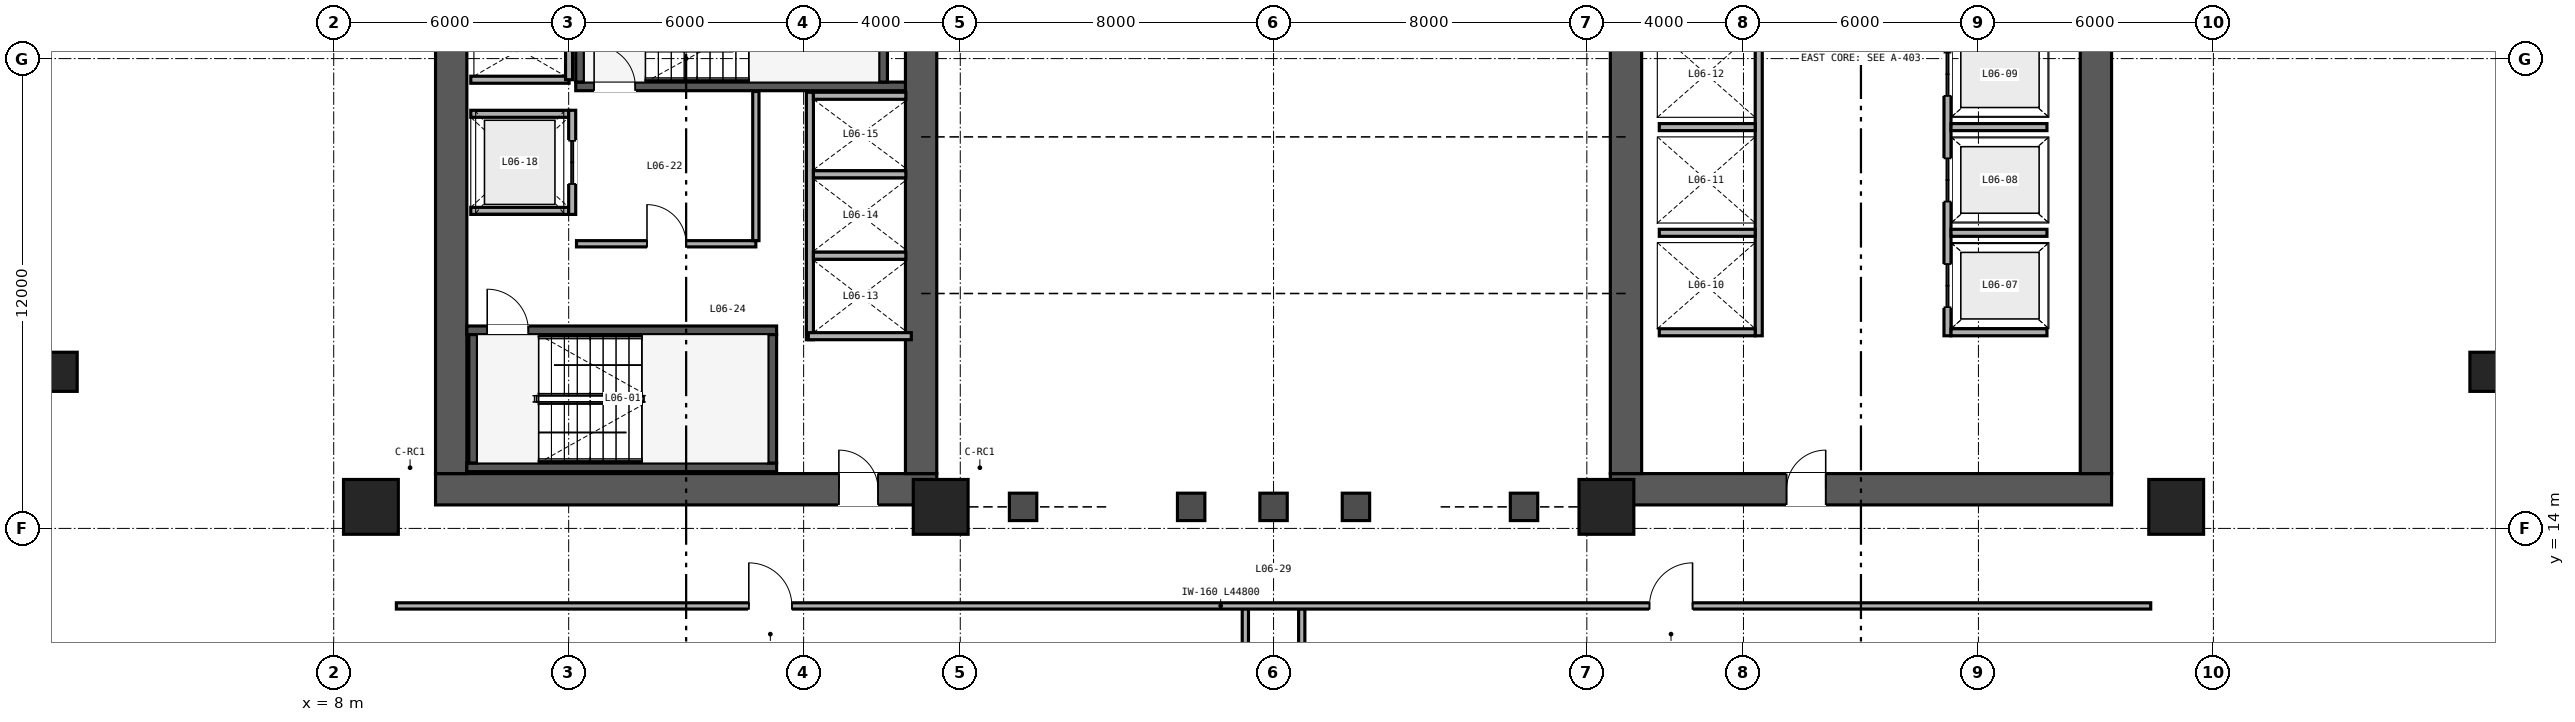
"""IFC4 building model, lengths in metres.
Left out: names, types, materials, properties, quantities, classifications, styles, units other than length and angle.
Written with IfcOpenShell. Run it as: python <this file> out.ifc"""

import sys

from ifc_helpers import new_model, si_unit, direction, frame, frame_2d, origin, origin_2d, place, context, subcontext, project, spatial, rectangle, extrude, source, transform, mapped, element, fill, save


model = new_model("IFC4")
c1 = context("Model", 3, precision=1e-05, world=origin(), true_north=direction((0.0, 1.0)))
c2 = subcontext(c1, "Body", "Model", "MODEL_VIEW")
j1 = project(units=[si_unit("LENGTHUNIT", "METRE"), si_unit("PLANEANGLEUNIT", "RADIAN")], contexts=[c1])
p1 = place(None, origin())
s1 = spatial("IfcSite", under=j1, at=p1, CompositionType="ELEMENT")
p2 = place(p1, origin())
s2 = spatial("IfcBuilding", under=s1, at=p2, CompositionType="ELEMENT")
p3 = place(p2, frame((0.0, 0.0, 28.8)))
s3 = spatial("IfcBuildingStorey", under=s2, at=p3, CompositionType="ELEMENT", Elevation=28.8)
p4 = place(p3, frame((10.6, 15.0, 0.0), z_axis=(0.0, 0.0, 1.0), x_axis=(1.0, 0.0, 0.0)))
e1 = element("IfcWall", 1, at=p4, inside=s3, PredefinedType="SHEAR", context=c2, shape_type="SweptSolid", body=[
    extrude(rectangle(XDim=12.8, YDim=0.8, at=frame_2d((6.4, 0.0))), origin(), (0.0, 0.0, 1.0), 5.75),
])
p5 = place(p4, frame((10.3, 0.0, 0.0)))
e2 = element("IfcOpeningElement", 2, at=p5, cuts=e1, PredefinedType="OPENING", context=c2, shape_type="SweptSolid", body=[
    extrude(rectangle(XDim=1.0, YDim=2.15, at=frame_2d((0.5, 1.075))), frame((0.0, 0.41, 0.0), z_axis=(0.0, -1.0, 0.0), x_axis=(1.0, 0.0, 0.0)), (0.0, 0.0, 1.0), 0.82),
])
for number, where, z_axis, x_axis in (
    (3, (11.0, 15.4, 0.0), (0.0, 0.0, 1.0), (0.0, 1.0, 0.0)),
    (4, (23.0, 15.4, 0.0), (0.0, 0.0, 1.0), (0.0, 1.0, 0.0)),
):
    element("IfcWall", number, at=place(p3, frame(where, z_axis=z_axis, x_axis=x_axis)), inside=s3, PredefinedType="SHEAR", context=c2, shape_type="SweptSolid", body=[
        extrude(rectangle(XDim=21.2, YDim=0.8, at=frame_2d((10.6, 0.0))), origin(), (0.0, 0.0, 1.0), 5.75),
    ])
p6 = place(p3, frame((40.6, 15.0, 0.0), z_axis=(0.0, 0.0, 1.0), x_axis=(1.0, 0.0, 0.0)))
e5 = element("IfcWall", 5, at=p6, inside=s3, PredefinedType="SHEAR", context=c2, shape_type="SweptSolid", body=[
    extrude(rectangle(XDim=12.8, YDim=0.8, at=frame_2d((6.4, 0.0))), origin(), (0.0, 0.0, 1.0), 5.75),
])
p7 = place(p6, frame((4.5, 0.0, 0.0)))
e6 = element("IfcOpeningElement", 6, at=p7, cuts=e5, PredefinedType="OPENING", context=c2, shape_type="SweptSolid", body=[
    extrude(rectangle(XDim=1.0, YDim=2.15, at=frame_2d((0.5, 1.075))), frame((0.0, 0.41, 0.0), z_axis=(0.0, -1.0, 0.0), x_axis=(1.0, 0.0, 0.0)), (0.0, 0.0, 1.0), 0.82),
])
for number, where, z_axis, x_axis in (
    (7, (41.0, 15.4, 0.0), (0.0, 0.0, 1.0), (0.0, 1.0, 0.0)),
    (8, (53.0, 15.4, 0.0), (0.0, 0.0, 1.0), (0.0, 1.0, 0.0)),
):
    element("IfcWall", number, at=place(p3, frame(where, z_axis=z_axis, x_axis=x_axis)), inside=s3, PredefinedType="SHEAR", context=c2, shape_type="SweptSolid", body=[
        extrude(rectangle(XDim=21.2, YDim=0.8, at=frame_2d((10.6, 0.0))), origin(), (0.0, 0.0, 1.0), 5.75),
    ])
p8 = place(p3, frame((11.4, 15.56, 0.0), z_axis=(0.0, 0.0, 1.0), x_axis=(1.0, 0.0, 0.0)))
e9 = element("IfcWall", 9, at=p8, inside=s3, PredefinedType="SHEAR", context=c2, shape_type="SweptSolid", body=[
    extrude(rectangle(XDim=7.91, YDim=0.22, at=frame_2d((3.955, 0.0))), origin(), (0.0, 0.0, 1.0), 5.8),
])
p9 = place(p3, frame((11.4, 19.06, 0.0), z_axis=(0.0, 0.0, 1.0), x_axis=(1.0, 0.0, 0.0)))
e10 = element("IfcWall", 10, at=p9, inside=s3, PredefinedType="SHEAR", context=c2, shape_type="SweptSolid", body=[
    extrude(rectangle(XDim=7.91, YDim=0.22, at=frame_2d((3.955, 0.0))), origin(), (0.0, 0.0, 1.0), 5.8),
])
p10 = place(p9, frame((0.52, 0.0, 0.0)))
e11 = element("IfcOpeningElement", 11, at=p10, cuts=e10, PredefinedType="OPENING", context=c2, shape_type="SweptSolid", body=[
    extrude(rectangle(XDim=1.05, YDim=2.15, at=frame_2d((0.525, 1.075))), frame((0.0, 0.12, 0.0), z_axis=(0.0, -1.0, 0.0), x_axis=(1.0, 0.0, 0.0)), (0.0, 0.0, 1.0), 0.24),
])
for number, where, z_axis, x_axis in (
    (12, (11.56, 15.67, 0.0), (0.0, 0.0, 1.0), (0.0, 1.0, 0.0)),
    (13, (19.2, 15.67, 0.0), (0.0, 0.0, 1.0), (0.0, 1.0, 0.0)),
):
    element("IfcWall", number, at=place(p3, frame(where, z_axis=z_axis, x_axis=x_axis)), inside=s3, PredefinedType="SHEAR", context=c2, shape_type="SweptSolid", body=[
        extrude(rectangle(XDim=3.28, YDim=0.22, at=frame_2d((1.64, 0.0))), origin(), (0.0, 0.0, 1.0), 5.8),
    ])
p11 = place(p3, frame((14.18, 25.29, 0.0), z_axis=(0.0, 0.0, 1.0), x_axis=(1.0, 0.0, 0.0)))
e14 = element("IfcWall", 14, at=p11, inside=s3, PredefinedType="SHEAR", context=c2, shape_type="SweptSolid", body=[
    extrude(rectangle(XDim=8.42, YDim=0.22, at=frame_2d((4.21, 0.0))), origin(), (0.0, 0.0, 1.0), 5.8),
])
p12 = place(p11, frame((0.47, 0.0, 0.0)))
e15 = element("IfcOpeningElement", 15, at=p12, cuts=e14, PredefinedType="OPENING", context=c2, shape_type="SweptSolid", body=[
    extrude(rectangle(XDim=1.05, YDim=2.15, at=frame_2d((0.525, 1.075))), frame((0.0, 0.12, 0.0), z_axis=(0.0, -1.0, 0.0), x_axis=(1.0, 0.0, 0.0)), (0.0, 0.0, 1.0), 0.24),
])
for number, where, z_axis, x_axis in (
    (16, (14.29, 25.4, 0.0), (0.0, 0.0, 1.0), (0.0, 1.0, 0.0)),
    (17, (22.03, 25.4, 0.0), (0.0, 0.0, 1.0), (0.0, 1.0, 0.0)),
):
    element("IfcWall", number, at=place(p3, frame(where, z_axis=z_axis, x_axis=x_axis)), inside=s3, PredefinedType="SHEAR", context=c2, shape_type="SweptSolid", body=[
        extrude(rectangle(XDim=3.28, YDim=0.22, at=frame_2d((1.64, 0.0))), origin(), (0.0, 0.0, 1.0), 5.8),
    ])
m1 = source(origin(), c2, "Body", "SweptSolid", [
    extrude(rectangle(XDim=1.0, YDim=1.0, at=origin_2d()), origin(), (0.0, 0.0, 1.0), 5.75),
])
for number, where, z_axis, x_axis in (
    (18, (0.95, 18.0, 0.0), (0.0, 0.0, 1.0), (1.0, 0.0, 0.0)),
    (19, (63.05, 18.0, 0.0), (0.0, 0.0, 1.0), (1.0, 0.0, 0.0)),
):
    element("IfcColumn", number, at=place(p3, frame(where, z_axis=z_axis, x_axis=x_axis)), inside=s3, PredefinedType="COLUMN", context=c2, shape_type="MappedRepresentation", body=[
        mapped(m1, transform((0.0, 0.0, 0.0), scale=1.0)),
    ])
m2 = source(origin(), c2, "Body", "SweptSolid", [
    extrude(rectangle(XDim=1.4, YDim=1.4, at=origin_2d()), origin(), (0.0, 0.0, 1.0), 5.75),
])
for number, where, z_axis, x_axis in (
    (20, (8.95, 14.55, 0.0), (0.0, 0.0, 1.0), (1.0, 0.0, 0.0)),
    (21, (23.5, 14.55, 0.0), (0.0, 0.0, 1.0), (1.0, 0.0, 0.0)),
    (22, (40.5, 14.55, 0.0), (0.0, 0.0, 1.0), (1.0, 0.0, 0.0)),
    (23, (55.05, 14.55, 0.0), (0.0, 0.0, 1.0), (1.0, 0.0, 0.0)),
):
    element("IfcColumn", number, at=place(p3, frame(where, z_axis=z_axis, x_axis=x_axis)), inside=s3, PredefinedType="COLUMN", context=c2, shape_type="MappedRepresentation", body=[
        mapped(m2, transform((0.0, 0.0, 0.0), scale=1.0)),
    ])
p13 = place(p3, frame((49.21, 18.92, 0.0), z_axis=(0.0, 0.0, 1.0), x_axis=(0.0, 1.0, 0.0)))
e24 = element("IfcWall", 24, at=p13, inside=s3, PredefinedType="SOLIDWALL", context=c2, shape_type="SweptSolid", body=[
    extrude(rectangle(XDim=7.96, YDim=0.18, at=frame_2d((3.98, 0.0))), origin(), (0.0, 0.0, 1.0), 5.75),
])
p14 = place(p13, frame((0.73, 0.0, 0.0)))
e25 = element("IfcOpeningElement", 25, at=p14, cuts=e24, PredefinedType="OPENING", context=c2, shape_type="SweptSolid", body=[
    extrude(rectangle(XDim=1.1, YDim=2.2, at=frame_2d((0.55, 1.1))), frame((0.0, 0.1, 0.0), z_axis=(0.0, -1.0, 0.0), x_axis=(1.0, 0.0, 0.0)), (0.0, 0.0, 1.0), 0.2),
])
p15 = place(p13, frame((3.43, 0.0, 0.0)))
e26 = element("IfcOpeningElement", 26, at=p15, cuts=e24, PredefinedType="OPENING", context=c2, shape_type="SweptSolid", body=[
    extrude(rectangle(XDim=1.1, YDim=2.2, at=frame_2d((0.55, 1.1))), frame((0.0, 0.1, 0.0), z_axis=(0.0, -1.0, 0.0), x_axis=(1.0, 0.0, 0.0)), (0.0, 0.0, 1.0), 0.2),
])
p16 = place(p13, frame((6.13, 0.0, 0.0)))
e27 = element("IfcOpeningElement", 27, at=p16, cuts=e24, PredefinedType="OPENING", context=c2, shape_type="SweptSolid", body=[
    extrude(rectangle(XDim=1.1, YDim=2.2, at=frame_2d((0.55, 1.1))), frame((0.0, 0.1, 0.0), z_axis=(0.0, -1.0, 0.0), x_axis=(1.0, 0.0, 0.0)), (0.0, 0.0, 1.0), 0.2),
])
for number, where, z_axis, x_axis in (
    (28, (49.3, 19.01, 0.0), (0.0, 0.0, 1.0), (1.0, 0.0, 0.0)),
    (29, (49.3, 21.55, 0.0), (0.0, 0.0, 1.0), (1.0, 0.0, 0.0)),
    (30, (49.3, 24.25, 0.0), (0.0, 0.0, 1.0), (1.0, 0.0, 0.0)),
):
    element("IfcWall", number, at=place(p3, frame(where, z_axis=z_axis, x_axis=x_axis)), inside=s3, PredefinedType="SOLIDWALL", context=c2, shape_type="SweptSolid", body=[
        extrude(rectangle(XDim=2.45, YDim=0.18, at=frame_2d((1.225, 0.0))), origin(), (0.0, 0.0, 1.0), 5.75),
    ])
p17 = place(p3, frame((44.39, 18.92, 0.0), z_axis=(0.0, 0.0, 1.0), x_axis=(0.0, 1.0, 0.0)))
e31 = element("IfcWall", 31, at=p17, inside=s3, PredefinedType="SOLIDWALL", context=c2, shape_type="SweptSolid", body=[
    extrude(rectangle(XDim=7.96, YDim=0.18, at=frame_2d((3.98, 0.0))), origin(), (0.0, 0.0, 1.0), 5.75),
])
for number, where, z_axis, x_axis in (
    (32, (41.85, 19.01, 0.0), (0.0, 0.0, 1.0), (1.0, 0.0, 0.0)),
    (33, (41.85, 21.55, 0.0), (0.0, 0.0, 1.0), (1.0, 0.0, 0.0)),
    (34, (41.85, 24.25, 0.0), (0.0, 0.0, 1.0), (1.0, 0.0, 0.0)),
):
    element("IfcWall", number, at=place(p3, frame(where, z_axis=z_axis, x_axis=x_axis)), inside=s3, PredefinedType="SOLIDWALL", context=c2, shape_type="SweptSolid", body=[
        extrude(rectangle(XDim=2.45, YDim=0.18, at=frame_2d((1.225, 0.0))), origin(), (0.0, 0.0, 1.0), 5.75),
    ])
p18 = place(p3, frame((20.16, 18.82, 0.0), z_axis=(0.0, 0.0, 1.0), x_axis=(0.0, 1.0, 0.0)))
e35 = element("IfcWall", 35, at=p18, inside=s3, PredefinedType="SOLIDWALL", context=c2, shape_type="SweptSolid", body=[
    extrude(rectangle(XDim=6.32, YDim=0.18, at=frame_2d((3.16, 0.0))), origin(), (0.0, 0.0, 1.0), 4.65),
])
p19 = place(p3, frame((20.12, 18.91, 0.0), z_axis=(0.0, 0.0, 1.0), x_axis=(1.0, 0.0, 0.0)))
e36 = element("IfcWall", 36, at=p19, inside=s3, PredefinedType="SOLIDWALL", context=c2, shape_type="SweptSolid", body=[
    extrude(rectangle(XDim=2.63, YDim=0.18, at=frame_2d((1.315, 0.0))), origin(), (0.0, 0.0, 1.0), 5.75),
])
p20 = place(p3, frame((20.25, 25.05, 0.0), z_axis=(0.0, 0.0, 1.0), x_axis=(1.0, 0.0, 0.0)))
e37 = element("IfcWall", 37, at=p20, inside=s3, PredefinedType="SOLIDWALL", context=c2, shape_type="SweptSolid", body=[
    extrude(rectangle(XDim=2.36, YDim=0.18, at=frame_2d((1.18, 0.0))), origin(), (0.0, 0.0, 1.0), 5.75),
])
p21 = place(p3, frame((20.25, 20.965, 0.0), z_axis=(0.0, 0.0, 1.0), x_axis=(1.0, 0.0, 0.0)))
e38 = element("IfcWall", 38, at=p21, inside=s3, PredefinedType="SOLIDWALL", context=c2, shape_type="SweptSolid", body=[
    extrude(rectangle(XDim=2.36, YDim=0.18, at=frame_2d((1.18, 0.0))), origin(), (0.0, 0.0, 1.0), 4.65),
])
p22 = place(p3, frame((20.25, 23.045, 0.0), z_axis=(0.0, 0.0, 1.0), x_axis=(1.0, 0.0, 0.0)))
e39 = element("IfcWall", 39, at=p22, inside=s3, PredefinedType="SOLIDWALL", context=c2, shape_type="SweptSolid", body=[
    extrude(rectangle(XDim=2.36, YDim=0.18, at=frame_2d((1.18, 0.0))), origin(), (0.0, 0.0, 1.0), 5.75),
])
for number, where, z_axis, x_axis in (
    (40, (11.5, 22.11, 0.0), (0.0, 0.0, 1.0), (1.0, 0.0, 0.0)),
    (41, (11.5, 24.59, 0.0), (0.0, 0.0, 1.0), (1.0, 0.0, 0.0)),
):
    element("IfcWall", number, at=place(p3, frame(where, z_axis=z_axis, x_axis=x_axis)), inside=s3, PredefinedType="SOLIDWALL", context=c2, shape_type="SweptSolid", body=[
        extrude(rectangle(XDim=2.5, YDim=0.18, at=frame_2d((1.25, 0.0))), origin(), (0.0, 0.0, 1.0), 5.75),
    ])
p23 = place(p3, frame((14.09, 22.02, 0.0), z_axis=(0.0, 0.0, 1.0), x_axis=(0.0, 1.0, 0.0)))
e42 = element("IfcWall", 42, at=p23, inside=s3, PredefinedType="SOLIDWALL", context=c2, shape_type="SweptSolid", body=[
    extrude(rectangle(XDim=2.66, YDim=0.18, at=frame_2d((1.33, 0.0))), origin(), (0.0, 0.0, 1.0), 5.75),
])
p24 = place(p23, frame((0.78, 0.0, 0.0)))
e43 = element("IfcOpeningElement", 43, at=p24, cuts=e42, PredefinedType="OPENING", context=c2, shape_type="SweptSolid", body=[
    extrude(rectangle(XDim=1.1, YDim=2.2, at=frame_2d((0.55, 1.1))), frame((0.0, 0.1, 0.0), z_axis=(0.0, -1.0, 0.0), x_axis=(1.0, 0.0, 0.0)), (0.0, 0.0, 1.0), 0.2),
])
p25 = place(p3, frame((11.5, 25.46, 0.0), z_axis=(0.0, 0.0, 1.0), x_axis=(1.0, 0.0, 0.0)))
e44 = element("IfcWall", 44, at=p25, inside=s3, PredefinedType="SOLIDWALL", context=c2, shape_type="SweptSolid", body=[
    extrude(rectangle(XDim=2.51, YDim=0.18, at=frame_2d((1.255, 0.0))), origin(), (0.0, 0.0, 1.0), 5.75),
])
p26 = place(p3, frame((14.01, 25.46, 0.0), z_axis=(0.0, 0.0, 1.0), x_axis=(0.0, 1.0, 0.0)))
e45 = element("IfcWall", 45, at=p26, inside=s3, PredefinedType="SOLIDWALL", context=c2, shape_type="SweptSolid", body=[
    extrude(rectangle(XDim=3.08, YDim=0.18, at=frame_2d((1.54, 0.0))), origin(), (0.0, 0.0, 1.0), 5.75),
])
p27 = place(p3, frame((14.2, 21.27, 0.0), z_axis=(0.0, 0.0, 1.0), x_axis=(1.0, 0.0, 0.0)))
e46 = element("IfcWall", 46, at=p27, inside=s3, PredefinedType="PARTITIONING", context=c2, shape_type="SweptSolid", body=[
    extrude(rectangle(XDim=4.58, YDim=0.16, at=frame_2d((2.29, 0.0))), origin(), (0.0, 0.0, 1.0), 5.75),
])
p28 = place(p27, frame((1.8, 0.0, 0.0)))
e47 = element("IfcOpeningElement", 47, at=p28, cuts=e46, PredefinedType="OPENING", context=c2, shape_type="SweptSolid", body=[
    extrude(rectangle(XDim=1.0, YDim=2.15, at=frame_2d((0.5, 1.075))), frame((0.0, 0.09, 0.0), z_axis=(0.0, -1.0, 0.0), x_axis=(1.0, 0.0, 0.0)), (0.0, 0.0, 1.0), 0.18),
])
p29 = place(p3, frame((18.78, 21.35, 0.0), z_axis=(0.0, 0.0, 1.0), x_axis=(0.0, 1.0, 0.0)))
e48 = element("IfcWall", 48, at=p29, inside=s3, PredefinedType="PARTITIONING", context=c2, shape_type="SweptSolid", body=[
    extrude(rectangle(XDim=3.81, YDim=0.16, at=frame_2d((1.905, 0.0))), origin(), (0.0, 0.0, 1.0), 5.75),
])
for number, where, z_axis, x_axis in (
    (49, (31.28, 3.45, 0.0), (0.0, 0.0, 1.0), (0.0, 1.0, 0.0)),
    (50, (32.72, 3.45, 0.0), (0.0, 0.0, 1.0), (0.0, 1.0, 0.0)),
):
    element("IfcWall", number, at=place(p3, frame(where, z_axis=z_axis, x_axis=x_axis)), inside=s3, PredefinedType="PARTITIONING", context=c2, shape_type="SweptSolid", body=[
        extrude(rectangle(XDim=8.5, YDim=0.16, at=frame_2d((4.25, 0.0))), origin(), (0.0, 0.0, 1.0), 5.75),
    ])
p30 = place(p3, frame((9.6, 12.02, 0.0), z_axis=(0.0, 0.0, 1.0), x_axis=(1.0, 0.0, 0.0)))
e51 = element("IfcWall", 51, at=p30, inside=s3, PredefinedType="PARTITIONING", context=c2, shape_type="SweptSolid", body=[
    extrude(rectangle(XDim=44.8, YDim=0.16, at=frame_2d((22.4, 0.0))), origin(), (0.0, 0.0, 1.0), 4.971),
])
p31 = place(p30, frame((9.0, 0.0, 0.0)))
e52 = element("IfcOpeningElement", 52, at=p31, cuts=e51, PredefinedType="OPENING", context=c2, shape_type="SweptSolid", body=[
    extrude(rectangle(XDim=1.1, YDim=2.15, at=frame_2d((0.55, 1.075))), frame((0.0, 0.09, 0.0), z_axis=(0.0, -1.0, 0.0), x_axis=(1.0, 0.0, 0.0)), (0.0, 0.0, 1.0), 0.18),
])
p32 = place(p30, frame((32.0, 0.0, 0.0)))
e53 = element("IfcOpeningElement", 53, at=p32, cuts=e51, PredefinedType="OPENING", context=c2, shape_type="SweptSolid", body=[
    extrude(rectangle(XDim=1.1, YDim=2.15, at=frame_2d((0.55, 1.075))), frame((0.0, 0.09, 0.0), z_axis=(0.0, -1.0, 0.0), x_axis=(1.0, 0.0, 0.0)), (0.0, 0.0, 1.0), 0.18),
])
m3 = source(origin(), c2, "Body", "SweptSolid", [
    extrude(rectangle(XDim=1.05, YDim=2.15, at=frame_2d((0.525, 1.075))), frame((0.0, 0.025, 0.0), z_axis=(0.0, -1.0, 0.0), x_axis=(1.0, 0.0, 0.0)), (0.0, 0.0, 1.0), 0.05),
])
p33 = place(p10, origin())
e54 = element("IfcDoor", 54, at=p33, inside=s3, OperationType="SINGLE_SWING_LEFT", PredefinedType="DOOR", context=c2, shape_type="MappedRepresentation", body=[
    mapped(m3, transform((0.0, 0.0, 0.0), scale=1.0)),
])
fill(e11, e54)
p34 = place(p12, origin())
e55 = element("IfcDoor", 55, at=p34, inside=s3, OperationType="SINGLE_SWING_LEFT", PredefinedType="DOOR", context=c2, shape_type="MappedRepresentation", body=[
    mapped(m3, transform((0.0, 0.0, 0.0), scale=1.0)),
])
fill(e15, e55)
m4 = source(origin(), c2, "Body", "SweptSolid", [
    extrude(rectangle(XDim=1.1, YDim=2.2, at=frame_2d((0.55, 1.1))), frame((0.0, 0.025, 0.0), z_axis=(0.0, -1.0, 0.0), x_axis=(1.0, 0.0, 0.0)), (0.0, 0.0, 1.0), 0.05),
])
p35 = place(p14, origin())
e56 = element("IfcDoor", 56, at=p35, inside=s3, OperationType="DOUBLE_DOOR_SLIDING", PredefinedType="DOOR", context=c2, shape_type="MappedRepresentation", body=[
    mapped(m4, transform((0.0, 0.0, 0.0), scale=1.0)),
])
fill(e25, e56)
p36 = place(p15, origin())
e57 = element("IfcDoor", 57, at=p36, inside=s3, OperationType="DOUBLE_DOOR_SLIDING", PredefinedType="DOOR", context=c2, shape_type="MappedRepresentation", body=[
    mapped(m4, transform((0.0, 0.0, 0.0), scale=1.0)),
])
fill(e26, e57)
p37 = place(p16, origin())
e58 = element("IfcDoor", 58, at=p37, inside=s3, OperationType="DOUBLE_DOOR_SLIDING", PredefinedType="DOOR", context=c2, shape_type="MappedRepresentation", body=[
    mapped(m4, transform((0.0, 0.0, 0.0), scale=1.0)),
])
fill(e27, e58)
p38 = place(p24, origin())
e59 = element("IfcDoor", 59, at=p38, inside=s3, OperationType="DOUBLE_DOOR_SLIDING", PredefinedType="DOOR", context=c2, shape_type="MappedRepresentation", body=[
    mapped(m4, transform((0.0, 0.0, 0.0), scale=1.0)),
])
fill(e43, e59)
m5 = source(origin(), c2, "Body", "SweptSolid", [
    extrude(rectangle(XDim=1.0, YDim=2.15, at=frame_2d((0.5, 1.075))), frame((0.0, 0.025, 0.0), z_axis=(0.0, -1.0, 0.0), x_axis=(1.0, 0.0, 0.0)), (0.0, 0.0, 1.0), 0.05),
])
p39 = place(p28, origin())
e60 = element("IfcDoor", 60, at=p39, inside=s3, OperationType="SINGLE_SWING_LEFT", PredefinedType="DOOR", context=c2, shape_type="MappedRepresentation", body=[
    mapped(m5, transform((0.0, 0.0, 0.0), scale=1.0)),
])
fill(e47, e60)
p40 = place(p5, origin())
e61 = element("IfcDoor", 61, at=p40, inside=s3, OperationType="SINGLE_SWING_LEFT", PredefinedType="DOOR", context=c2, shape_type="MappedRepresentation", body=[
    mapped(m5, transform((0.0, 0.0, 0.0), scale=1.0)),
])
fill(e2, e61)
p41 = place(p7, origin())
e62 = element("IfcDoor", 62, at=p41, inside=s3, OperationType="SINGLE_SWING_RIGHT", PredefinedType="DOOR", context=c2, shape_type="MappedRepresentation", body=[
    mapped(m5, transform((0.0, 0.0, 0.0), scale=1.0)),
])
fill(e6, e62)
m6 = source(origin(), c2, "Body", "SweptSolid", [
    extrude(rectangle(XDim=1.1, YDim=2.15, at=frame_2d((0.55, 1.075))), frame((0.0, 0.025, 0.0), z_axis=(0.0, -1.0, 0.0), x_axis=(1.0, 0.0, 0.0)), (0.0, 0.0, 1.0), 0.05),
])
p42 = place(p31, origin())
e63 = element("IfcDoor", 63, at=p42, inside=s3, OperationType="SINGLE_SWING_LEFT", PredefinedType="DOOR", context=c2, shape_type="MappedRepresentation", body=[
    mapped(m6, transform((0.0, 0.0, 0.0), scale=1.0)),
])
fill(e52, e63)
p43 = place(p32, origin())
e64 = element("IfcDoor", 64, at=p43, inside=s3, OperationType="SINGLE_SWING_RIGHT", PredefinedType="DOOR", context=c2, shape_type="MappedRepresentation", body=[
    mapped(m6, transform((0.0, 0.0, 0.0), scale=1.0)),
])
fill(e53, e64)
save(model, sys.argv[1])
